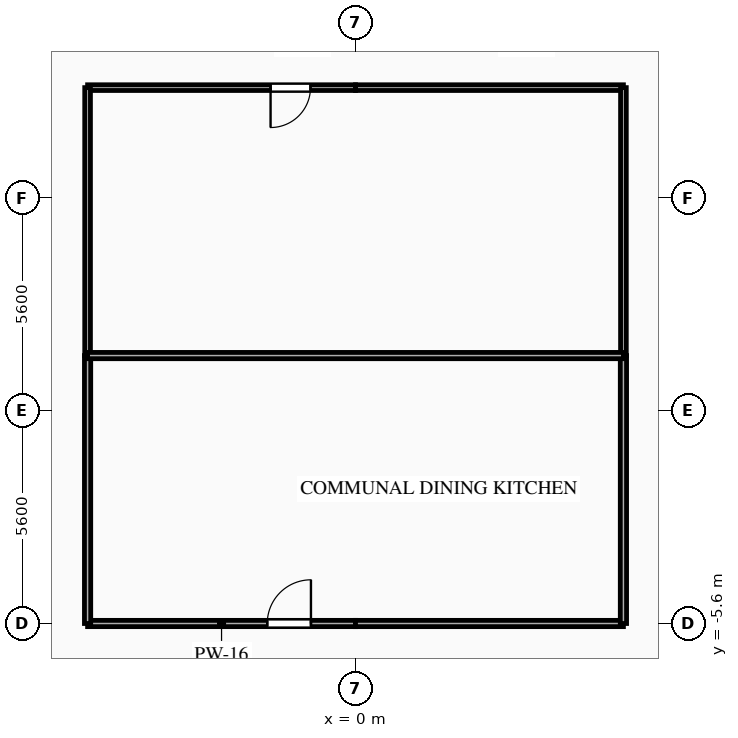
"""IFC4 building model, lengths in metres.
Left out: names, types, materials, properties, quantities, classifications, styles, units other than length and angle.
Written with IfcOpenShell. Run it as: python <this file> out.ifc"""

import sys

from ifc_helpers import new_model, si_unit, direction, frame, frame_2d, origin, place, context, subcontext, project, spatial, rectangle, extrude, element, fill, save


model = new_model("IFC4")
c1 = context("Model", 3, precision=1e-05, world=origin(), true_north=direction((0.0, 1.0)))
c2 = subcontext(c1, "Body", "Model", "MODEL_VIEW")
j1 = project(units=[si_unit("LENGTHUNIT", "METRE"), si_unit("PLANEANGLEUNIT", "RADIAN")], contexts=[c1])
p1 = place(None, origin())
s1 = spatial("IfcSite", under=j1, at=p1, CompositionType="ELEMENT")
p2 = place(p1, origin())
s2 = spatial("IfcBuilding", under=s1, at=p2, CompositionType="ELEMENT")
p3 = place(p2, frame((0.0, 0.0, 119.2)))
s3 = spatial("IfcBuildingStorey", under=s2, at=p3, CompositionType="ELEMENT", Elevation=119.2)
p4 = place(p3, frame((0.0, 8.5, 0.0), z_axis=(0.0, 0.0, 1.0), x_axis=(-1.0, 0.0, 0.0)))
e1 = element("IfcWall", 1, at=p4, inside=s3, PredefinedType="PARTITIONING", context=c2, shape_type="SweptSolid", body=[
    extrude(rectangle(XDim=7.05, YDim=0.15, at=frame_2d((3.525, 0.0))), origin(), (0.0, 0.0, 1.0), 3.045),
])
p5 = place(p4, frame((1.185, 0.0, 0.0)))
e2 = element("IfcOpeningElement", 2, at=p5, cuts=e1, PredefinedType="OPENING", context=c2, shape_type="SweptSolid", body=[
    extrude(rectangle(XDim=1.05, YDim=2.15, at=frame_2d((0.525, 1.075))), frame((0.0, 0.085, 0.0), z_axis=(0.0, -1.0, 0.0), x_axis=(1.0, 0.0, 0.0)), (0.0, 0.0, 1.0), 0.17),
])
p6 = place(p3, frame((7.05, 8.5, 0.0), z_axis=(0.0, 0.0, 1.0), x_axis=(-1.0, 0.0, 0.0)))
e3 = element("IfcWall", 3, at=p6, inside=s3, PredefinedType="PARTITIONING", context=c2, shape_type="SweptSolid", body=[
    extrude(rectangle(XDim=7.05, YDim=0.15, at=frame_2d((3.525, 0.0))), origin(), (0.0, 0.0, 1.0), 3.045),
])
p7 = place(p3, frame((-7.05, -5.6, 0.0), z_axis=(0.0, 0.0, 1.0), x_axis=(1.0, 0.0, 0.0)))
e4 = element("IfcWall", 4, at=p7, inside=s3, PredefinedType="PARTITIONING", context=c2, shape_type="SweptSolid", body=[
    extrude(rectangle(XDim=7.05, YDim=0.165, at=frame_2d((3.525, 0.0))), origin(), (0.0, 0.0, 1.0), 2.53),
])
p8 = place(p7, frame((4.728, 0.0, 0.0)))
e5 = element("IfcOpeningElement", 5, at=p8, cuts=e4, PredefinedType="OPENING", context=c2, shape_type="SweptSolid", body=[
    extrude(rectangle(XDim=1.15, YDim=2.15, at=frame_2d((0.575, 1.075))), frame((0.0, 0.093, 0.0), z_axis=(0.0, -1.0, 0.0), x_axis=(1.0, 0.0, 0.0)), (0.0, 0.0, 1.0), 0.185),
])
p9 = place(p3, frame((0.0, -5.6, 0.0), z_axis=(0.0, 0.0, 1.0), x_axis=(1.0, 0.0, 0.0)))
e6 = element("IfcWall", 6, at=p9, inside=s3, PredefinedType="PARTITIONING", context=c2, shape_type="SweptSolid", body=[
    extrude(rectangle(XDim=7.05, YDim=0.165, at=frame_2d((3.525, 0.0))), origin(), (0.0, 0.0, 1.0), 2.53),
])
p10 = place(p3, frame((-7.05, 1.45, 0.0), z_axis=(0.0, 0.0, 1.0), x_axis=(0.0, -1.0, 0.0)))
e7 = element("IfcWall", 7, at=p10, inside=s3, PredefinedType="PARTITIONING", context=c2, shape_type="SweptSolid", body=[
    extrude(rectangle(XDim=7.05, YDim=0.165, at=frame_2d((3.525, 0.0))), origin(), (0.0, 0.0, 1.0), 3.045),
])
p11 = place(p3, frame((-7.05, 8.5, 0.0), z_axis=(0.0, 0.0, 1.0), x_axis=(0.0, -1.0, 0.0)))
e8 = element("IfcWall", 8, at=p11, inside=s3, PredefinedType="PARTITIONING", context=c2, shape_type="SweptSolid", body=[
    extrude(rectangle(XDim=7.05, YDim=0.15, at=frame_2d((3.525, 0.0))), origin(), (0.0, 0.0, 1.0), 3.045),
])
p12 = place(p3, frame((7.05, -5.6, 0.0), z_axis=(0.0, 0.0, 1.0), x_axis=(0.0, 1.0, 0.0)))
e9 = element("IfcWall", 9, at=p12, inside=s3, PredefinedType="PARTITIONING", context=c2, shape_type="SweptSolid", body=[
    extrude(rectangle(XDim=7.05, YDim=0.165, at=frame_2d((3.525, 0.0))), origin(), (0.0, 0.0, 1.0), 3.045),
])
p13 = place(p3, frame((7.05, 1.45, 0.0), z_axis=(0.0, 0.0, 1.0), x_axis=(0.0, 1.0, 0.0)))
e10 = element("IfcWall", 10, at=p13, inside=s3, PredefinedType="PARTITIONING", context=c2, shape_type="SweptSolid", body=[
    extrude(rectangle(XDim=7.05, YDim=0.15, at=frame_2d((3.525, 0.0))), origin(), (0.0, 0.0, 1.0), 3.045),
])
p14 = place(p3, frame((-7.05, 1.45, 0.0), z_axis=(0.0, 0.0, 1.0), x_axis=(1.0, 0.0, 0.0)))
e11 = element("IfcWall", 11, at=p14, inside=s3, PredefinedType="PARTITIONING", context=c2, shape_type="SweptSolid", body=[
    extrude(rectangle(XDim=14.1, YDim=0.165, at=frame_2d((7.05, 0.0))), origin(), (0.0, 0.0, 1.0), 3.045),
])
p15 = place(p5, origin())
e12 = element("IfcDoor", 12, at=p15, inside=s3, OperationType="SINGLE_SWING_RIGHT", PredefinedType="DOOR", context=c2, shape_type="SweptSolid", body=[
    extrude(rectangle(XDim=1.05, YDim=2.15, at=frame_2d((0.525, 1.075))), frame((0.0, 0.025, 0.0), z_axis=(0.0, -1.0, 0.0), x_axis=(1.0, 0.0, 0.0)), (0.0, 0.0, 1.0), 0.05),
])
fill(e2, e12)
p16 = place(p8, origin())
e13 = element("IfcDoor", 13, at=p16, inside=s3, OperationType="SINGLE_SWING_RIGHT", PredefinedType="DOOR", context=c2, shape_type="SweptSolid", body=[
    extrude(rectangle(XDim=1.15, YDim=2.15, at=frame_2d((0.575, 1.075))), frame((0.0, 0.025, 0.0), z_axis=(0.0, -1.0, 0.0), x_axis=(1.0, 0.0, 0.0)), (0.0, 0.0, 1.0), 0.05),
])
fill(e5, e13)
save(model, sys.argv[1])
